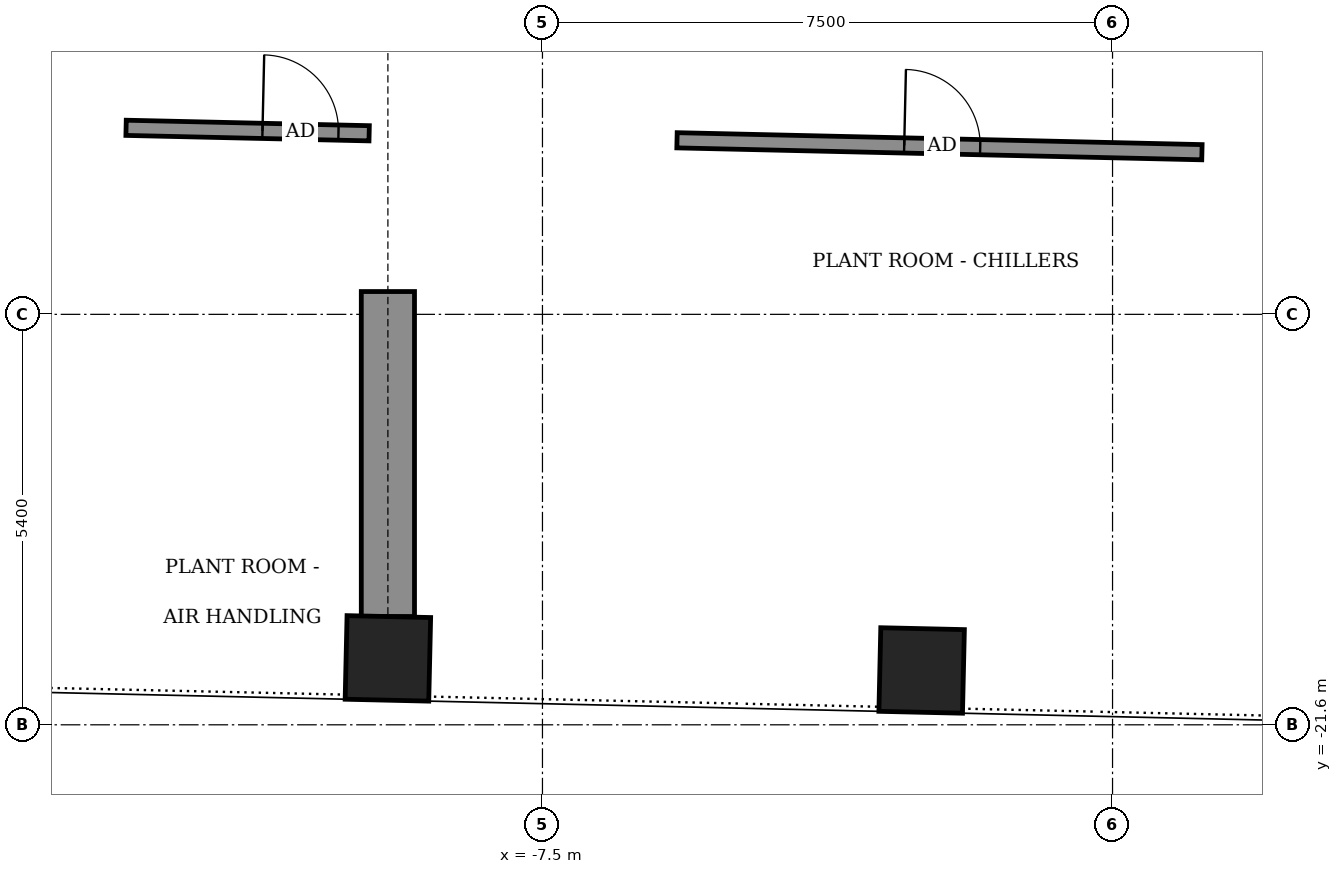
"""IFC4 building model, lengths in metres.
Left out: names, types, materials, properties, quantities, classifications, styles, units other than length and angle.
Written with IfcOpenShell. Run it as: python <this file> out.ifc"""

import sys

from ifc_helpers import new_model, si_unit, direction, frame, frame_2d, origin, origin_2d, place, context, subcontext, project, spatial, rectangle, extrude, element, fill, save


model = new_model("IFC4")
c1 = context("Model", 3, precision=1e-05, world=origin(), true_north=direction((0.0, 1.0)))
c2 = subcontext(c1, "Body", "Model", "MODEL_VIEW")
j1 = project(units=[si_unit("LENGTHUNIT", "METRE"), si_unit("PLANEANGLEUNIT", "RADIAN")], contexts=[c1])
p1 = place(None, origin())
s1 = spatial("IfcSite", under=j1, at=p1, CompositionType="ELEMENT")
p2 = place(p1, origin())
s2 = spatial("IfcBuilding", under=s1, at=p2, CompositionType="ELEMENT")
p3 = place(p2, frame((0.0, 0.0, 219.5)))
s3 = spatial("IfcBuildingStorey", under=s2, at=p3, CompositionType="ELEMENT", Elevation=219.5)
for number, where, z_axis, x_axis in (
    (1, (-9.533, -20.726, -0.55), (0.0, 0.0, 1.0), (1.0, -0.023, 0.0)),
    (2, (-2.511, -20.885, -0.55), (0.0, 0.0, 1.0), (1.0, -0.023, 0.0)),
):
    element("IfcColumn", number, at=place(p3, frame(where, z_axis=z_axis, x_axis=x_axis)), inside=s3, PredefinedType="COLUMN", context=c2, shape_type="SweptSolid", body=[
        extrude(rectangle(XDim=1.1, YDim=1.1, at=origin_2d()), origin(), (0.0, 0.0, 1.0), 7.0),
    ])
p4 = place(p3, frame((-9.533, -15.9, 0.0), z_axis=(0.0, 0.0, 1.0), x_axis=(0.0, -1.0, 0.0)))
e3 = element("IfcWall", 3, at=p4, inside=s3, PredefinedType="SHEAR", context=c2, shape_type="SweptSolid", body=[
    extrude(rectangle(XDim=4.276, YDim=0.7, at=frame_2d((2.138, 0.0))), origin(), (0.0, 0.0, 1.0), 3.0),
])
p5 = place(p3, frame((-12.978, -13.746, 0.0), z_axis=(0.0, 0.0, 1.0), x_axis=(0.999746503137, -0.022515094162, 0.0)))
e4 = element("IfcWall", 4, at=p5, inside=s3, PredefinedType="PARTITIONING", context=c2, shape_type="SweptSolid", body=[
    extrude(rectangle(XDim=3.199, YDim=0.2, at=frame_2d((1.599, 0.0))), origin(), (0.0, 0.0, 1.0), 3.0),
])
p6 = place(p5, frame((1.795, 0.0, 0.0)))
e5 = element("IfcOpeningElement", 5, at=p6, cuts=e4, PredefinedType="OPENING", context=c2, shape_type="SweptSolid", body=[
    extrude(rectangle(XDim=1.0, YDim=2.1, at=frame_2d((0.5, 1.05))), frame((0.0, 0.11, 0.0), z_axis=(0.0, -1.0, 0.0), x_axis=(1.0, 0.0, 0.0)), (0.0, 0.0, 1.0), 0.22),
])
p7 = place(p3, frame((-5.73, -13.91, 0.0), z_axis=(0.0, 0.0, 1.0), x_axis=(0.999741744306, -0.022725419507, 0.0)))
e6 = element("IfcWall", 6, at=p7, inside=s3, PredefinedType="PARTITIONING", context=c2, shape_type="SweptSolid", body=[
    extrude(rectangle(XDim=6.908, YDim=0.2, at=frame_2d((3.454, 0.0))), origin(), (0.0, 0.0, 1.0), 6.45),
])
p8 = place(p7, frame((2.99, 0.0, 0.0)))
e7 = element("IfcOpeningElement", 7, at=p8, cuts=e6, PredefinedType="OPENING", context=c2, shape_type="SweptSolid", body=[
    extrude(rectangle(XDim=1.0, YDim=2.1, at=frame_2d((0.5, 1.05))), frame((0.0, 0.11, 0.0), z_axis=(0.0, -1.0, 0.0), x_axis=(1.0, 0.0, 0.0)), (0.0, 0.0, 1.0), 0.22),
])
p9 = place(p6, origin())
e8 = element("IfcDoor", 8, at=p9, inside=s3, OperationType="SINGLE_SWING_RIGHT", PredefinedType="DOOR", context=c2, shape_type="SweptSolid", body=[
    extrude(rectangle(XDim=1.0, YDim=2.1, at=frame_2d((0.5, 1.05))), frame((0.0, 0.025, 0.0), z_axis=(0.0, -1.0, 0.0), x_axis=(1.0, 0.0, 0.0)), (0.0, 0.0, 1.0), 0.05),
])
fill(e5, e8)
p10 = place(p8, origin())
e9 = element("IfcDoor", 9, at=p10, inside=s3, OperationType="SINGLE_SWING_LEFT", PredefinedType="DOOR", context=c2, shape_type="SweptSolid", body=[
    extrude(rectangle(XDim=1.0, YDim=2.1, at=frame_2d((0.5, 1.05))), frame((0.0, 0.025, 0.0), z_axis=(0.0, -1.0, 0.0), x_axis=(1.0, 0.0, 0.0)), (0.0, 0.0, 1.0), 0.05),
])
fill(e7, e9)
save(model, sys.argv[1])
